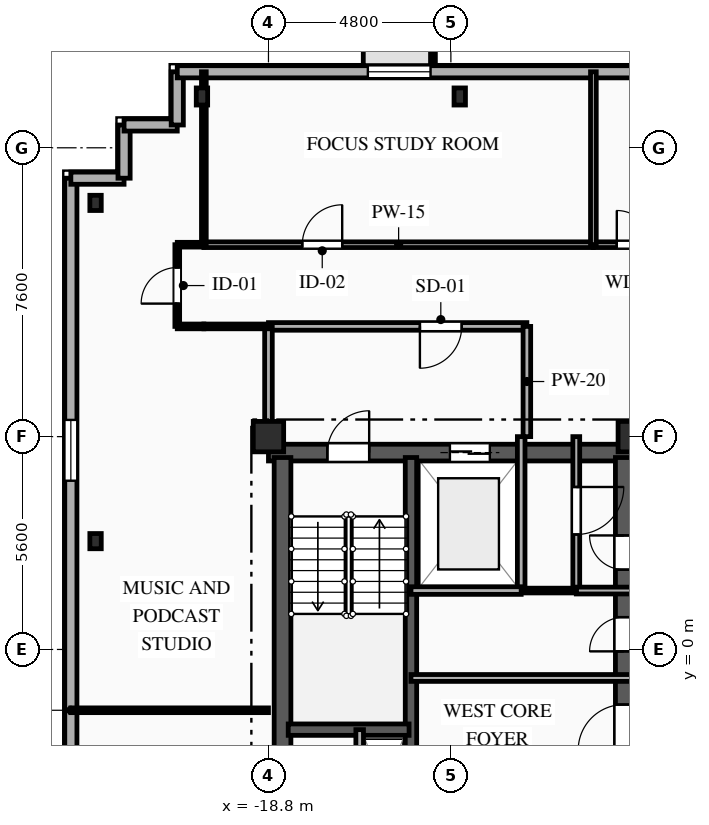
"""IFC4 building model, lengths in metres.
Left out: names, types, materials, properties, quantities, classifications, styles, units other than length and angle.
Written with IfcOpenShell. Run it as: python <this file> out.ifc"""

import sys

from ifc_helpers import new_model, si_unit, direction, frame, frame_2d, origin, origin_2d, place, context, subcontext, project, spatial, rectangle, i_section, extrude, element, fill, save


model = new_model("IFC4")
c1 = context("Model", 3, precision=1e-05, world=origin(), true_north=direction((0.0, 1.0)))
c2 = subcontext(c1, "Body", "Model", "MODEL_VIEW")
j1 = project(units=[si_unit("LENGTHUNIT", "METRE"), si_unit("PLANEANGLEUNIT", "RADIAN")], contexts=[c1])
p1 = place(None, origin())
s1 = spatial("IfcSite", under=j1, at=p1, CompositionType="ELEMENT")
p2 = place(p1, origin())
s2 = spatial("IfcBuilding", under=s1, at=p2, CompositionType="ELEMENT")
p3 = place(p2, frame((0.0, 0.0, 238.35)))
s3 = spatial("IfcBuildingStorey", under=s2, at=p3, CompositionType="ELEMENT", Elevation=238.35)
for number, where, z_axis, x_axis in (
    (1, (-18.8, 5.6, 0.0), (0.0, 0.0, 1.0), (1.0, 0.0, 0.0)),
    (2, (-9.2, 5.6, 0.0), (0.0, 0.0, 1.0), (1.0, 0.0, 0.0)),
):
    element("IfcColumn", number, at=place(p3, frame(where, z_axis=z_axis, x_axis=x_axis)), inside=s3, PredefinedType="COLUMN", context=c2, shape_type="SweptSolid", body=[
        extrude(rectangle(XDim=0.8, YDim=0.8, at=origin_2d()), origin(), (0.0, 0.0, 1.0), 3.35),
    ])
for number, where, z_axis, x_axis in (
    (3, (-13.767, 14.55, 0.0), (0.0, 0.0, 1.0), (1.0, 0.0, 0.0)),
    (4, (-20.55, 14.55, 0.0), (0.0, 0.0, 1.0), (1.0, 0.0, 0.0)),
):
    element("IfcColumn", number, at=place(p3, frame(where, z_axis=z_axis, x_axis=x_axis)), inside=s3, PredefinedType="COLUMN", context=c2, shape_type="SweptSolid", body=[
        extrude(i_section(OverallWidth=0.3, OverallDepth=0.45, WebThickness=0.014, FlangeThickness=0.026, FilletRadius=0.027, at=origin_2d()), origin(), (0.0, 0.0, 1.0), 3.35),
    ])
for number, where, z_axis, x_axis in (
    (5, (-23.35, 11.75, 0.0), (0.0, 0.0, 1.0), (1.0, 0.0, 0.0)),
    (6, (-23.35, 2.85, 0.0), (0.0, 0.0, 1.0), (1.0, 0.0, 0.0)),
):
    element("IfcColumn", number, at=place(p3, frame(where, z_axis=z_axis, x_axis=x_axis)), inside=s3, PredefinedType="COLUMN", context=c2, shape_type="SweptSolid", body=[
        extrude(i_section(OverallWidth=0.3, OverallDepth=0.4, WebThickness=0.013, FlangeThickness=0.024, FilletRadius=0.027, at=origin_2d()), origin(), (0.0, 0.0, 1.0), 3.35),
    ])
p4 = place(p3, frame((-24.0, -15.6, 0.0), z_axis=(0.0, 0.0, 1.0), x_axis=(0.0, 1.0, 0.0)))
e7 = element("IfcWall", 7, at=p4, inside=s3, PredefinedType="SOLIDWALL", context=c2, shape_type="SweptSolid", body=[
    extrude(rectangle(XDim=28.0, YDim=0.32, at=frame_2d((14.0, 0.0))), origin(), (0.0, 0.0, 1.0), 3.04),
])
p5 = place(p4, frame((6.415, 0.0, 0.85)))
e8 = element("IfcOpeningElement", 8, at=p5, cuts=e7, PredefinedType="OPENING", context=c2, shape_type="SweptSolid", body=[
    extrude(rectangle(XDim=1.65, YDim=1.85, at=frame_2d((0.825, 0.925))), frame((0.0, 0.17, 0.0), z_axis=(0.0, -1.0, 0.0), x_axis=(1.0, 0.0, 0.0)), (0.0, 0.0, 1.0), 0.34),
])
p6 = place(p4, frame((20.04, 0.0, 0.85)))
e9 = element("IfcOpeningElement", 9, at=p6, cuts=e7, PredefinedType="OPENING", context=c2, shape_type="SweptSolid", body=[
    extrude(rectangle(XDim=1.6, YDim=1.85, at=frame_2d((0.8, 0.925))), frame((0.0, 0.17, 0.0), z_axis=(0.0, -1.0, 0.0), x_axis=(1.0, 0.0, 0.0)), (0.0, 0.0, 1.0), 0.34),
])
p7 = place(p3, frame((-24.0, 12.4, 0.0), z_axis=(0.0, 0.0, 1.0), x_axis=(1.0, 0.0, 0.0)))
e10 = element("IfcWall", 10, at=p7, inside=s3, PredefinedType="SOLIDWALL", context=c2, shape_type="SweptSolid", body=[
    extrude(rectangle(XDim=1.4, YDim=0.32, at=frame_2d((0.7, 0.0))), origin(), (0.0, 0.0, 1.0), 3.04),
])
for number, where, z_axis, x_axis in (
    (11, (-22.6, 12.4, 0.0), (0.0, 0.0, 1.0), (0.0, 1.0, 0.0)),
    (12, (-22.6, 13.8, 0.0), (0.0, 0.0, 1.0), (1.0, 0.0, 0.0)),
):
    element("IfcWall", number, at=place(p3, frame(where, z_axis=z_axis, x_axis=x_axis)), inside=s3, PredefinedType="SOLIDWALL", context=c2, shape_type="SweptSolid", body=[
        extrude(rectangle(XDim=1.4, YDim=0.32, at=frame_2d((0.7, 0.0))), origin(), (0.0, 0.0, 1.0), 3.04),
    ])
p8 = place(p3, frame((-21.2, 13.8, 0.0), z_axis=(0.0, 0.0, 1.0), x_axis=(0.0, 1.0, 0.0)))
e13 = element("IfcWall", 13, at=p8, inside=s3, PredefinedType="SOLIDWALL", context=c2, shape_type="SweptSolid", body=[
    extrude(rectangle(XDim=1.4, YDim=0.32, at=frame_2d((0.7, 0.0))), origin(), (0.0, 0.0, 1.0), 3.04),
])
p9 = place(p3, frame((-21.2, 15.2, 0.0), z_axis=(0.0, 0.0, 1.0), x_axis=(1.0, 0.0, 0.0)))
e14 = element("IfcWall", 14, at=p9, inside=s3, PredefinedType="SOLIDWALL", context=c2, shape_type="SweptSolid", body=[
    extrude(rectangle(XDim=42.0, YDim=0.32, at=frame_2d((21.0, 0.0))), origin(), (0.0, 0.0, 1.0), 3.04),
])
p10 = place(p9, frame((5.015, 0.0, 0.85)))
e15 = element("IfcOpeningElement", 15, at=p10, cuts=e14, PredefinedType="OPENING", context=c2, shape_type="SweptSolid", body=[
    extrude(rectangle(XDim=1.65, YDim=1.85, at=frame_2d((0.825, 0.925))), frame((0.0, 0.17, 0.0), z_axis=(0.0, -1.0, 0.0), x_axis=(1.0, 0.0, 0.0)), (0.0, 0.0, 1.0), 0.34),
])
p11 = place(p9, frame((16.48, 0.0, 0.85)))
e16 = element("IfcOpeningElement", 16, at=p11, cuts=e14, PredefinedType="OPENING", context=c2, shape_type="SweptSolid", body=[
    extrude(rectangle(XDim=1.6, YDim=1.85, at=frame_2d((0.8, 0.925))), frame((0.0, 0.17, 0.0), z_axis=(0.0, -1.0, 0.0), x_axis=(1.0, 0.0, 0.0)), (0.0, 0.0, 1.0), 0.34),
])
p12 = place(p9, frame((25.575, 0.0, 0.85)))
e17 = element("IfcOpeningElement", 17, at=p12, cuts=e14, PredefinedType="OPENING", context=c2, shape_type="SweptSolid", body=[
    extrude(rectangle(XDim=1.65, YDim=1.85, at=frame_2d((0.825, 0.925))), frame((0.0, 0.17, 0.0), z_axis=(0.0, -1.0, 0.0), x_axis=(1.0, 0.0, 0.0)), (0.0, 0.0, 1.0), 0.34),
])
p13 = place(p9, frame((35.735, 0.0, 0.85)))
e18 = element("IfcOpeningElement", 18, at=p13, cuts=e14, PredefinedType="OPENING", context=c2, shape_type="SweptSolid", body=[
    extrude(rectangle(XDim=1.65, YDim=1.85, at=frame_2d((0.825, 0.925))), frame((0.0, 0.17, 0.0), z_axis=(0.0, -1.0, 0.0), x_axis=(1.0, 0.0, 0.0)), (0.0, 0.0, 1.0), 0.34),
])
p14 = place(p3, frame((-18.8, 5.18, 0.0), z_axis=(0.0, 0.0, 1.0), x_axis=(1.0, 0.0, 0.0)))
e19 = element("IfcWall", 19, at=p14, inside=s3, PredefinedType="SHEAR", context=c2, shape_type="SweptSolid", body=[
    extrude(rectangle(XDim=9.6, YDim=0.44, at=frame_2d((4.8, 0.0))), origin(), (0.0, 0.0, 1.0), 3.04),
])
p15 = place(p14, frame((1.55, 0.0, 0.0)))
e20 = element("IfcOpeningElement", 20, at=p15, cuts=e19, PredefinedType="OPENING", context=c2, shape_type="SweptSolid", body=[
    extrude(rectangle(XDim=1.1, YDim=2.15, at=frame_2d((0.55, 1.075))), frame((0.0, 0.23, 0.0), z_axis=(0.0, -1.0, 0.0), x_axis=(1.0, 0.0, 0.0)), (0.0, 0.0, 1.0), 0.46),
])
p16 = place(p14, frame((4.775, 0.0, 0.0)))
e21 = element("IfcOpeningElement", 21, at=p16, cuts=e19, PredefinedType="OPENING", context=c2, shape_type="SweptSolid", body=[
    extrude(rectangle(XDim=1.05, YDim=2.1, at=frame_2d((0.525, 1.05))), frame((0.0, 0.23, 0.0), z_axis=(0.0, -1.0, 0.0), x_axis=(1.0, 0.0, 0.0)), (0.0, 0.0, 1.0), 0.46),
])
p17 = place(p3, frame((-18.43, -5.05, 0.0), z_axis=(0.0, 0.0, 1.0), x_axis=(0.0, 1.0, 0.0)))
e22 = element("IfcWall", 22, at=p17, inside=s3, PredefinedType="SHEAR", context=c2, shape_type="SweptSolid", body=[
    extrude(rectangle(XDim=10.1, YDim=0.44, at=frame_2d((5.05, 0.0))), origin(), (0.0, 0.0, 1.0), 3.04),
])
p18 = place(p3, frame((-9.45, -5.05, 0.0), z_axis=(0.0, 0.0, 1.0), x_axis=(0.0, 1.0, 0.0)))
e23 = element("IfcWall", 23, at=p18, inside=s3, PredefinedType="SHEAR", context=c2, shape_type="SweptSolid", body=[
    extrude(rectangle(XDim=10.1, YDim=0.44, at=frame_2d((5.05, 0.0))), origin(), (0.0, 0.0, 1.0), 3.04),
])
p19 = place(p18, frame((7.15, 0.0, 0.0)))
e24 = element("IfcOpeningElement", 24, at=p19, cuts=e23, PredefinedType="OPENING", context=c2, shape_type="SweptSolid", body=[
    extrude(rectangle(XDim=0.9, YDim=2.1, at=frame_2d((0.45, 1.05))), frame((0.0, 0.23, 0.0), z_axis=(0.0, -1.0, 0.0), x_axis=(1.0, 0.0, 0.0)), (0.0, 0.0, 1.0), 0.46),
])
p20 = place(p18, frame((2.4, 0.0, 0.0)))
e25 = element("IfcOpeningElement", 25, at=p20, cuts=e23, PredefinedType="OPENING", context=c2, shape_type="SweptSolid", body=[
    extrude(rectangle(XDim=1.2, YDim=2.15, at=frame_2d((0.6, 1.075))), frame((0.0, 0.23, 0.0), z_axis=(0.0, -1.0, 0.0), x_axis=(1.0, 0.0, 0.0)), (0.0, 0.0, 1.0), 0.46),
])
p21 = place(p18, frame((0.35, 0.0, 0.0)))
e26 = element("IfcOpeningElement", 26, at=p21, cuts=e23, PredefinedType="OPENING", context=c2, shape_type="SweptSolid", body=[
    extrude(rectangle(XDim=0.9, YDim=2.1, at=frame_2d((0.45, 1.05))), frame((0.0, 0.23, 0.0), z_axis=(0.0, -1.0, 0.0), x_axis=(1.0, 0.0, 0.0)), (0.0, 0.0, 1.0), 0.46),
])
p22 = place(p18, frame((5.0, 0.0, 0.0)))
e27 = element("IfcOpeningElement", 27, at=p22, cuts=e23, PredefinedType="OPENING", context=c2, shape_type="SweptSolid", body=[
    extrude(rectangle(XDim=0.9, YDim=2.1, at=frame_2d((0.45, 1.05))), frame((0.0, 0.23, 0.0), z_axis=(0.0, -1.0, 0.0), x_axis=(1.0, 0.0, 0.0)), (0.0, 0.0, 1.0), 0.46),
])
p23 = place(p3, frame((-15.05, -5.05, 0.0), z_axis=(0.0, 0.0, 1.0), x_axis=(0.0, 1.0, 0.0)))
e28 = element("IfcWall", 28, at=p23, inside=s3, PredefinedType="SHEAR", context=c2, shape_type="SweptSolid", body=[
    extrude(rectangle(XDim=10.1, YDim=0.3, at=frame_2d((5.05, 0.0))), origin(), (0.0, 0.0, 1.0), 3.04),
])
p24 = place(p3, frame((-18.28, -2.11, 0.0), z_axis=(0.0, 0.0, 1.0), x_axis=(1.0, 0.0, 0.0)))
e29 = element("IfcWall", 29, at=p24, inside=s3, PredefinedType="SHEAR", context=c2, shape_type="SweptSolid", body=[
    extrude(rectangle(XDim=3.18, YDim=0.3, at=frame_2d((1.59, 0.0))), origin(), (0.0, 0.0, 1.0), 3.04),
])
p25 = place(p3, frame((-16.4, -5.6, 0.0), z_axis=(0.0, 0.0, 1.0), x_axis=(0.0, 1.0, 0.0)))
e30 = element("IfcWall", 30, at=p25, inside=s3, PredefinedType="PARTITIONING", context=c2, shape_type="SweptSolid", body=[
    extrude(rectangle(XDim=3.49, YDim=0.2, at=frame_2d((1.745, 0.0))), origin(), (0.0, 0.0, 1.0), 3.04),
])
p26 = place(p3, frame((-12.15, 1.55, 0.0), z_axis=(0.0, 0.0, 1.0), x_axis=(0.0, 1.0, 0.0)))
e31 = element("IfcWall", 31, at=p26, inside=s3, PredefinedType="PARTITIONING", context=c2, shape_type="SweptSolid", body=[
    extrude(rectangle(XDim=4.05, YDim=0.2, at=frame_2d((2.025, 0.0))), origin(), (0.0, 0.0, 1.0), 3.04),
])
p27 = place(p3, frame((-12.0, 8.5, 0.0), z_axis=(0.0, 0.0, 1.0), x_axis=(-1.0, 0.0, 0.0)))
e32 = element("IfcWall", 32, at=p27, inside=s3, PredefinedType="PARTITIONING", context=c2, shape_type="SweptSolid", body=[
    extrude(rectangle(XDim=6.8, YDim=0.2, at=frame_2d((3.4, 0.0))), origin(), (0.0, 0.0, 1.0), 3.04),
])
p28 = place(p27, frame((1.715, 0.0, 0.0)))
e33 = element("IfcOpeningElement", 33, at=p28, cuts=e32, PredefinedType="OPENING", context=c2, shape_type="SweptSolid", body=[
    extrude(rectangle(XDim=1.1, YDim=2.15, at=frame_2d((0.55, 1.075))), frame((0.0, 0.11, 0.0), z_axis=(0.0, -1.0, 0.0), x_axis=(1.0, 0.0, 0.0)), (0.0, 0.0, 1.0), 0.22),
])
p29 = place(p3, frame((-12.0, 5.6, 0.0), z_axis=(0.0, 0.0, 1.0), x_axis=(0.0, 1.0, 0.0)))
e34 = element("IfcWall", 34, at=p29, inside=s3, PredefinedType="PARTITIONING", context=c2, shape_type="SweptSolid", body=[
    extrude(rectangle(XDim=2.9, YDim=0.2, at=frame_2d((1.45, 0.0))), origin(), (0.0, 0.0, 1.0), 3.04),
])
p30 = place(p3, frame((-18.8, 8.5, 0.0), z_axis=(0.0, 0.0, 1.0), x_axis=(0.0, -1.0, 0.0)))
e35 = element("IfcWall", 35, at=p30, inside=s3, PredefinedType="PARTITIONING", context=c2, shape_type="SweptSolid", body=[
    extrude(rectangle(XDim=2.9, YDim=0.2, at=frame_2d((1.45, 0.0))), origin(), (0.0, 0.0, 1.0), 2.665),
])
p31 = place(p3, frame((-10.7, 5.6, 0.0), z_axis=(0.0, 0.0, 1.0), x_axis=(0.0, -1.0, 0.0)))
e36 = element("IfcWall", 36, at=p31, inside=s3, PredefinedType="PARTITIONING", context=c2, shape_type="SweptSolid", body=[
    extrude(rectangle(XDim=4.05, YDim=0.18, at=frame_2d((2.025, 0.0))), origin(), (0.0, 0.0, 1.0), 3.04),
])
p32 = place(p31, frame((1.325, 0.0, 0.0)))
e37 = element("IfcOpeningElement", 37, at=p32, cuts=e36, PredefinedType="OPENING", context=c2, shape_type="SweptSolid", body=[
    extrude(rectangle(XDim=1.25, YDim=2.2, at=frame_2d((0.625, 1.1))), frame((0.0, 0.1, 0.0), z_axis=(0.0, -1.0, 0.0), x_axis=(1.0, 0.0, 0.0)), (0.0, 0.0, 1.0), 0.2),
])
p33 = place(p3, frame((-10.7, 1.55, 0.0), z_axis=(0.0, 0.0, 1.0), x_axis=(1.0, 0.0, 0.0)))
e38 = element("IfcWall", 38, at=p33, inside=s3, PredefinedType="PARTITIONING", context=c2, shape_type="SweptSolid", body=[
    extrude(rectangle(XDim=1.5, YDim=0.18, at=frame_2d((0.75, 0.0))), origin(), (0.0, 0.0, 1.0), 3.04),
])
p34 = place(p3, frame((-12.15, 1.55, 0.0), z_axis=(0.0, 0.0, 1.0), x_axis=(1.0, 0.0, 0.0)))
e39 = element("IfcWall", 39, at=p34, inside=s3, PredefinedType="PARTITIONING", context=c2, shape_type="SweptSolid", body=[
    extrude(rectangle(XDim=1.45, YDim=0.125, at=frame_2d((0.725, 0.0))), origin(), (0.0, 0.0, 1.0), 3.04),
])
p35 = place(p3, frame((-9.2, -0.75, 0.0), z_axis=(0.0, 0.0, 1.0), x_axis=(-1.0, 0.0, 0.0)))
e40 = element("IfcWall", 40, at=p35, inside=s3, PredefinedType="PARTITIONING", context=c2, shape_type="SweptSolid", body=[
    extrude(rectangle(XDim=5.85, YDim=0.18, at=frame_2d((2.925, 0.0))), origin(), (0.0, 0.0, 1.0), 3.04),
])
p36 = place(p3, frame((-21.2, 8.5, 0.0), z_axis=(0.0, 0.0, 1.0), x_axis=(0.0, 1.0, 0.0)))
e41 = element("IfcWall", 41, at=p36, inside=s3, PredefinedType="PARTITIONING", context=c2, shape_type="SweptSolid", body=[
    extrude(rectangle(XDim=2.15, YDim=0.125, at=frame_2d((1.075, 0.0))), origin(), (0.0, 0.0, 1.0), 2.695),
])
p37 = place(p36, frame((0.6, 0.0, 0.0)))
e42 = element("IfcOpeningElement", 42, at=p37, cuts=e41, PredefinedType="OPENING", context=c2, shape_type="SweptSolid", body=[
    extrude(rectangle(XDim=0.95, YDim=2.1, at=frame_2d((0.475, 1.05))), frame((0.0, 0.073, 0.0), z_axis=(0.0, -1.0, 0.0), x_axis=(1.0, 0.0, 0.0)), (0.0, 0.0, 1.0), 0.145),
])
p38 = place(p3, frame((-18.8, 8.5, 0.0), z_axis=(0.0, 0.0, 1.0), x_axis=(-1.0, 0.0, 0.0)))
e43 = element("IfcWall", 43, at=p38, inside=s3, PredefinedType="PARTITIONING", context=c2, shape_type="SweptSolid", body=[
    extrude(rectangle(XDim=1.7, YDim=0.125, at=frame_2d((0.85, 0.0))), origin(), (0.0, 0.0, 1.0), 3.04),
])
for number, where, z_axis, x_axis in (
    (44, (-20.5, 8.5, 0.0), (0.0, 0.0, 1.0), (-1.0, 0.0, 0.0)),
    (45, (-21.2, 10.65, 0.0), (0.0, 0.0, 1.0), (1.0, 0.0, 0.0)),
):
    element("IfcWall", number, at=place(p3, frame(where, z_axis=z_axis, x_axis=x_axis)), inside=s3, PredefinedType="PARTITIONING", context=c2, shape_type="SweptSolid", body=[
        extrude(rectangle(XDim=0.7, YDim=0.125, at=frame_2d((0.35, 0.0))), origin(), (0.0, 0.0, 1.0), 3.04),
    ])
p39 = place(p3, frame((-20.5, 10.65, 0.0), z_axis=(0.0, 0.0, 1.0), x_axis=(1.0, 0.0, 0.0)))
e46 = element("IfcWall", 46, at=p39, inside=s3, PredefinedType="PARTITIONING", context=c2, shape_type="SweptSolid", body=[
    extrude(rectangle(XDim=10.25, YDim=0.15, at=frame_2d((5.125, 0.0))), origin(), (0.0, 0.0, 1.0), 3.04),
])
p40 = place(p39, frame((2.59, 0.0, 0.0)))
e47 = element("IfcOpeningElement", 47, at=p40, cuts=e46, PredefinedType="OPENING", context=c2, shape_type="SweptSolid", body=[
    extrude(rectangle(XDim=1.05, YDim=2.15, at=frame_2d((0.525, 1.075))), frame((0.0, 0.085, 0.0), z_axis=(0.0, -1.0, 0.0), x_axis=(1.0, 0.0, 0.0)), (0.0, 0.0, 1.0), 0.17),
])
p41 = place(p3, frame((-10.25, 10.65, 0.0), z_axis=(0.0, 0.0, 1.0), x_axis=(1.0, 0.0, 0.0)))
e48 = element("IfcWall", 48, at=p41, inside=s3, PredefinedType="PLUMBINGWALL", context=c2, shape_type="SweptSolid", body=[
    extrude(rectangle(XDim=2.35, YDim=0.15, at=frame_2d((1.175, 0.0))), origin(), (0.0, 0.0, 1.0), 3.04),
])
p42 = place(p41, frame((0.616, 0.0, 0.0)))
e49 = element("IfcOpeningElement", 49, at=p42, cuts=e48, PredefinedType="OPENING", context=c2, shape_type="SweptSolid", body=[
    extrude(rectangle(XDim=0.9, YDim=2.1, at=frame_2d((0.45, 1.05))), frame((0.0, 0.085, 0.0), z_axis=(0.0, -1.0, 0.0), x_axis=(1.0, 0.0, 0.0)), (0.0, 0.0, 1.0), 0.17),
])
p43 = place(p3, frame((-24.0, -1.6, 0.0), z_axis=(0.0, 0.0, 1.0), x_axis=(1.0, 0.0, 0.0)))
e50 = element("IfcWall", 50, at=p43, inside=s3, PredefinedType="PARTITIONING", context=c2, shape_type="SweptSolid", body=[
    extrude(rectangle(XDim=5.2, YDim=0.125, at=frame_2d((2.6, 0.0))), origin(), (0.0, 0.0, 1.0), 3.04),
])
p44 = place(p3, frame((-20.5, 15.2, 0.0), z_axis=(0.0, 0.0, 1.0), x_axis=(0.0, -1.0, 0.0)))
e51 = element("IfcWall", 51, at=p44, inside=s3, PredefinedType="PARTITIONING", context=c2, shape_type="SweptSolid", body=[
    extrude(rectangle(XDim=4.55, YDim=0.125, at=frame_2d((2.275, 0.0))), origin(), (0.0, 0.0, 1.0), 2.665),
])
p45 = place(p3, frame((-10.25, 15.2, 0.0), z_axis=(0.0, 0.0, 1.0), x_axis=(0.0, -1.0, 0.0)))
e52 = element("IfcWall", 52, at=p45, inside=s3, PredefinedType="PLUMBINGWALL", context=c2, shape_type="SweptSolid", body=[
    extrude(rectangle(XDim=4.55, YDim=0.15, at=frame_2d((2.275, 0.0))), origin(), (0.0, 0.0, 1.0), 3.04),
])
p46 = place(p3, frame((-15.05, 1.55, 0.0), z_axis=(0.0, 0.0, 1.0), x_axis=(1.0, 0.0, 0.0)))
e53 = element("IfcWall", 53, at=p46, inside=s3, PredefinedType="PARTITIONING", context=c2, shape_type="SweptSolid", body=[
    extrude(rectangle(XDim=2.9, YDim=0.2, at=frame_2d((1.45, 0.0))), origin(), (0.0, 0.0, 1.0), 3.04),
])
p47 = place(p6, origin())
e54 = element("IfcWindow", 54, at=p47, inside=s3, PartitioningType="SINGLE_PANEL", PredefinedType="WINDOW", context=c2, shape_type="SweptSolid", body=[
    extrude(rectangle(XDim=1.6, YDim=1.85, at=frame_2d((0.8, 0.925))), frame((0.0, 0.03, 0.0), z_axis=(0.0, -1.0, 0.0), x_axis=(1.0, 0.0, 0.0)), (0.0, 0.0, 1.0), 0.06),
])
fill(e9, e54)
p48 = place(p10, origin())
e55 = element("IfcWindow", 55, at=p48, inside=s3, PartitioningType="SINGLE_PANEL", PredefinedType="WINDOW", context=c2, shape_type="SweptSolid", body=[
    extrude(rectangle(XDim=1.65, YDim=1.85, at=frame_2d((0.825, 0.925))), frame((0.0, 0.03, 0.0), z_axis=(0.0, -1.0, 0.0), x_axis=(1.0, 0.0, 0.0)), (0.0, 0.0, 1.0), 0.06),
])
fill(e15, e55)
p49 = place(p15, origin())
e56 = element("IfcDoor", 56, at=p49, inside=s3, OperationType="SINGLE_SWING_RIGHT", PredefinedType="DOOR", context=c2, shape_type="SweptSolid", body=[
    extrude(rectangle(XDim=1.1, YDim=2.15, at=frame_2d((0.55, 1.075))), frame((0.0, 0.025, 0.0), z_axis=(0.0, -1.0, 0.0), x_axis=(1.0, 0.0, 0.0)), (0.0, 0.0, 1.0), 0.05),
])
fill(e20, e56)
p50 = place(p16, origin())
e57 = element("IfcDoor", 57, at=p50, inside=s3, OperationType="DOUBLE_DOOR_SLIDING", PredefinedType="DOOR", context=c2, shape_type="SweptSolid", body=[
    extrude(rectangle(XDim=1.05, YDim=2.1, at=frame_2d((0.525, 1.05))), frame((0.0, 0.025, 0.0), z_axis=(0.0, -1.0, 0.0), x_axis=(1.0, 0.0, 0.0)), (0.0, 0.0, 1.0), 0.05),
])
fill(e21, e57)
p51 = place(p28, origin())
e58 = element("IfcDoor", 58, at=p51, inside=s3, OperationType="SINGLE_SWING_RIGHT", PredefinedType="DOOR", context=c2, shape_type="SweptSolid", body=[
    extrude(rectangle(XDim=1.1, YDim=2.15, at=frame_2d((0.55, 1.075))), frame((0.0, 0.025, 0.0), z_axis=(0.0, -1.0, 0.0), x_axis=(1.0, 0.0, 0.0)), (0.0, 0.0, 1.0), 0.05),
])
fill(e33, e58)
p52 = place(p32, origin())
e59 = element("IfcDoor", 59, at=p52, inside=s3, OperationType="SINGLE_SWING_LEFT", PredefinedType="DOOR", context=c2, shape_type="SweptSolid", body=[
    extrude(rectangle(XDim=1.25, YDim=2.2, at=frame_2d((0.625, 1.1))), frame((0.0, 0.025, 0.0), z_axis=(0.0, -1.0, 0.0), x_axis=(1.0, 0.0, 0.0)), (0.0, 0.0, 1.0), 0.05),
])
fill(e37, e59)
p53 = place(p19, origin())
e60 = element("IfcDoor", 60, at=p53, inside=s3, OperationType="SINGLE_SWING_RIGHT", PredefinedType="DOOR", context=c2, shape_type="SweptSolid", body=[
    extrude(rectangle(XDim=0.9, YDim=2.1, at=frame_2d((0.45, 1.05))), frame((0.0, 0.025, 0.0), z_axis=(0.0, -1.0, 0.0), x_axis=(1.0, 0.0, 0.0)), (0.0, 0.0, 1.0), 0.05),
])
fill(e24, e60)
p54 = place(p20, origin())
e61 = element("IfcDoor", 61, at=p54, inside=s3, OperationType="SINGLE_SWING_LEFT", PredefinedType="DOOR", context=c2, shape_type="SweptSolid", body=[
    extrude(rectangle(XDim=1.2, YDim=2.15, at=frame_2d((0.6, 1.075))), frame((0.0, 0.025, 0.0), z_axis=(0.0, -1.0, 0.0), x_axis=(1.0, 0.0, 0.0)), (0.0, 0.0, 1.0), 0.05),
])
fill(e25, e61)
p55 = place(p22, origin())
e62 = element("IfcDoor", 62, at=p55, inside=s3, OperationType="SINGLE_SWING_LEFT", PredefinedType="DOOR", context=c2, shape_type="SweptSolid", body=[
    extrude(rectangle(XDim=0.9, YDim=2.1, at=frame_2d((0.45, 1.05))), frame((0.0, 0.025, 0.0), z_axis=(0.0, -1.0, 0.0), x_axis=(1.0, 0.0, 0.0)), (0.0, 0.0, 1.0), 0.05),
])
fill(e27, e62)
p56 = place(p37, origin())
e63 = element("IfcDoor", 63, at=p56, inside=s3, OperationType="SINGLE_SWING_LEFT", PredefinedType="DOOR", context=c2, shape_type="SweptSolid", body=[
    extrude(rectangle(XDim=0.95, YDim=2.1, at=frame_2d((0.475, 1.05))), frame((0.0, 0.025, 0.0), z_axis=(0.0, -1.0, 0.0), x_axis=(1.0, 0.0, 0.0)), (0.0, 0.0, 1.0), 0.05),
])
fill(e42, e63)
p57 = place(p40, origin())
e64 = element("IfcDoor", 64, at=p57, inside=s3, OperationType="SINGLE_SWING_RIGHT", PredefinedType="DOOR", context=c2, shape_type="SweptSolid", body=[
    extrude(rectangle(XDim=1.05, YDim=2.15, at=frame_2d((0.525, 1.075))), frame((0.0, 0.025, 0.0), z_axis=(0.0, -1.0, 0.0), x_axis=(1.0, 0.0, 0.0)), (0.0, 0.0, 1.0), 0.05),
])
fill(e47, e64)
p58 = place(p42, origin())
e65 = element("IfcDoor", 65, at=p58, inside=s3, OperationType="SINGLE_SWING_LEFT", PredefinedType="DOOR", context=c2, shape_type="SweptSolid", body=[
    extrude(rectangle(XDim=0.9, YDim=2.1, at=frame_2d((0.45, 1.05))), frame((0.0, 0.025, 0.0), z_axis=(0.0, -1.0, 0.0), x_axis=(1.0, 0.0, 0.0)), (0.0, 0.0, 1.0), 0.05),
])
fill(e49, e65)
save(model, sys.argv[1])
